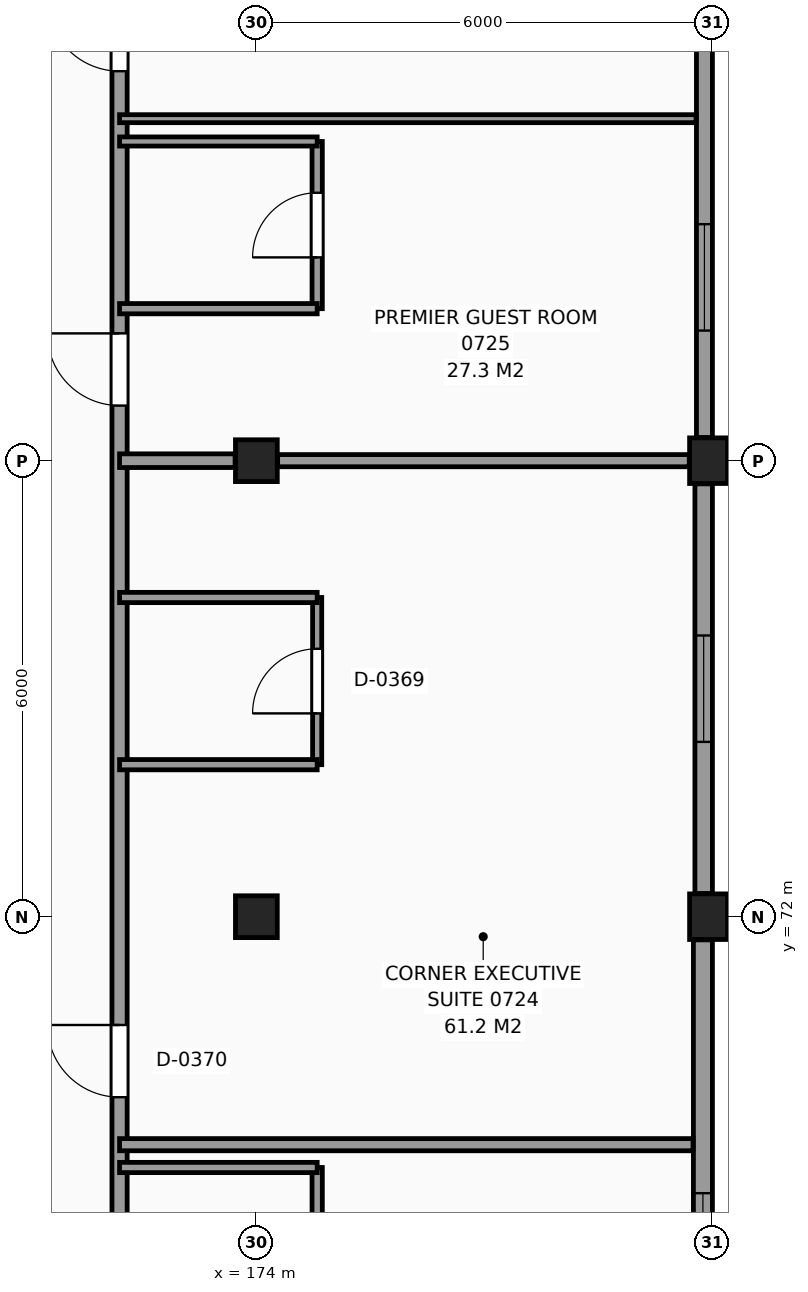
"""IFC4 building model, lengths in metres.
Left out: names, types, materials, properties, quantities, classifications, styles, units other than length and angle.
Written with IfcOpenShell. Run it as: python <this file> out.ifc"""

import sys

from ifc_helpers import new_model, si_unit, direction, frame, frame_2d, origin, origin_2d, place, context, subcontext, project, spatial, rectangle, extrude, element, fill, save


model = new_model("IFC4")
c1 = context("Model", 3, precision=1e-05, world=origin(), true_north=direction((0.0, 1.0)))
c2 = subcontext(c1, "Body", "Model", "MODEL_VIEW")
j1 = project(units=[si_unit("LENGTHUNIT", "METRE"), si_unit("PLANEANGLEUNIT", "RADIAN")], contexts=[c1])
p1 = place(None, origin())
s1 = spatial("IfcSite", under=j1, at=p1, CompositionType="ELEMENT")
p2 = place(p1, origin())
s2 = spatial("IfcBuilding", under=s1, at=p2, CompositionType="ELEMENT")
p3 = place(p2, frame((0.0, 0.0, 31.5)))
s3 = spatial("IfcBuildingStorey", under=s2, at=p3, CompositionType="ELEMENT", Elevation=31.5)
for number, where, z_axis, x_axis in (
    (1, (174.0, 72.0, 0.0), (0.0, 0.0, 1.0), (1.0, 0.0, 0.0)),
    (2, (174.0, 78.0, 0.0), (0.0, 0.0, 1.0), (1.0, 0.0, 0.0)),
):
    element("IfcColumn", number, at=place(p3, frame(where, z_axis=z_axis, x_axis=x_axis)), inside=s3, PredefinedType="COLUMN", context=c2, shape_type="SweptSolid", body=[
        extrude(rectangle(XDim=0.55, YDim=0.55, at=origin_2d()), origin(), (0.0, 0.0, 1.0), 3.3),
    ])
for number, where, z_axis, x_axis in (
    (3, (180.0, 72.0, 0.0), (0.0, 0.0, 1.0), (1.0, 0.0, 0.0)),
    (4, (180.0, 78.0, 0.0), (0.0, 0.0, 1.0), (1.0, 0.0, 0.0)),
):
    element("IfcColumn", number, at=place(p3, frame(where, z_axis=z_axis, x_axis=x_axis)), inside=s3, PredefinedType="COLUMN", context=c2, shape_type="SweptSolid", body=[
        extrude(rectangle(XDim=0.6, YDim=0.6, at=origin_2d()), origin(), (0.0, 0.0, 1.0), 3.3),
    ])
p4 = place(p3, frame((179.875, 66.305, 0.0), z_axis=(0.0, 0.0, 1.0), x_axis=(0.0, 1.0, 0.0)))
e5 = element("IfcWall", 5, at=p4, inside=s3, PredefinedType="SOLIDWALL", context=c2, shape_type="SweptSolid", body=[
    extrude(rectangle(XDim=5.39, YDim=0.25, at=frame_2d((2.695, 0.0))), origin(), (0.0, 0.0, 1.0), 2.42),
])
p5 = place(p4, frame((0.657, 0.0, 0.8)))
e6 = element("IfcOpeningElement", 6, at=p5, cuts=e5, PredefinedType="OPENING", context=c2, shape_type="SweptSolid", body=[
    extrude(rectangle(XDim=1.4, YDim=1.4, at=frame_2d((0.7, 0.7))), frame((0.0, 0.135, 0.0), z_axis=(0.0, -1.0, 0.0), x_axis=(1.0, 0.0, 0.0)), (0.0, 0.0, 1.0), 0.27),
])
p6 = place(p3, frame((179.885, 72.305, 0.0), z_axis=(0.0, 0.0, 1.0), x_axis=(0.0, 1.0, 0.0)))
e7 = element("IfcWall", 7, at=p6, inside=s3, PredefinedType="SOLIDWALL", context=c2, shape_type="SweptSolid", body=[
    extrude(rectangle(XDim=5.39, YDim=0.23, at=frame_2d((2.695, 0.0))), origin(), (0.0, 0.0, 1.0), 2.42),
])
p7 = place(p6, frame((1.995, 0.0, 0.8)))
e8 = element("IfcOpeningElement", 8, at=p7, cuts=e7, PredefinedType="OPENING", context=c2, shape_type="SweptSolid", body=[
    extrude(rectangle(XDim=1.4, YDim=1.4, at=frame_2d((0.7, 0.7))), frame((0.0, 0.125, 0.0), z_axis=(0.0, -1.0, 0.0), x_axis=(1.0, 0.0, 0.0)), (0.0, 0.0, 1.0), 0.25),
])
p8 = place(p3, frame((179.895, 78.305, 0.0), z_axis=(0.0, 0.0, 1.0), x_axis=(0.0, 1.0, 0.0)))
e9 = element("IfcWall", 9, at=p8, inside=s3, PredefinedType="SOLIDWALL", context=c2, shape_type="SweptSolid", body=[
    extrude(rectangle(XDim=5.39, YDim=0.21, at=frame_2d((2.695, 0.0))), origin(), (0.0, 0.0, 1.0), 2.42),
])
p9 = place(p8, frame((1.407, 0.0, 0.8)))
e10 = element("IfcOpeningElement", 10, at=p9, cuts=e9, PredefinedType="OPENING", context=c2, shape_type="SweptSolid", body=[
    extrude(rectangle(XDim=1.4, YDim=1.4, at=frame_2d((0.7, 0.7))), frame((0.0, 0.115, 0.0), z_axis=(0.0, -1.0, 0.0), x_axis=(1.0, 0.0, 0.0)), (0.0, 0.0, 1.0), 0.23),
])
p10 = place(p3, frame((172.2, 42.255, 0.0), z_axis=(0.0, 0.0, 1.0), x_axis=(0.0, 1.0, 0.0)))
e11 = element("IfcWall", 11, at=p10, inside=s3, PredefinedType="PARTITIONING", context=c2, shape_type="SweptSolid", body=[
    extrude(rectangle(XDim=65.565, YDim=0.2, at=frame_2d((32.783, 0.0))), origin(), (0.0, 0.0, 1.0), 3.07),
])
p11 = place(p10, frame((0.42, 0.0, 0.0)))
e12 = element("IfcOpeningElement", 12, at=p11, cuts=e11, PredefinedType="OPENING", context=c2, shape_type="SweptSolid", body=[
    extrude(rectangle(XDim=0.95, YDim=2.1, at=frame_2d((0.475, 1.05))), frame((0.0, 0.11, 0.0), z_axis=(0.0, -1.0, 0.0), x_axis=(1.0, 0.0, 0.0)), (0.0, 0.0, 1.0), 0.22),
])
p12 = place(p10, frame((6.47, 0.0, 0.0)))
e13 = element("IfcOpeningElement", 13, at=p12, cuts=e11, PredefinedType="OPENING", context=c2, shape_type="SweptSolid", body=[
    extrude(rectangle(XDim=0.95, YDim=2.1, at=frame_2d((0.475, 1.05))), frame((0.0, 0.11, 0.0), z_axis=(0.0, -1.0, 0.0), x_axis=(1.0, 0.0, 0.0)), (0.0, 0.0, 1.0), 0.22),
])
p13 = place(p10, frame((16.27, 0.0, 0.0)))
e14 = element("IfcOpeningElement", 14, at=p13, cuts=e11, PredefinedType="OPENING", context=c2, shape_type="SweptSolid", body=[
    extrude(rectangle(XDim=0.95, YDim=2.1, at=frame_2d((0.475, 1.05))), frame((0.0, 0.11, 0.0), z_axis=(0.0, -1.0, 0.0), x_axis=(1.0, 0.0, 0.0)), (0.0, 0.0, 1.0), 0.22),
])
p14 = place(p10, frame((18.47, 0.0, 0.0)))
e15 = element("IfcOpeningElement", 15, at=p14, cuts=e11, PredefinedType="OPENING", context=c2, shape_type="SweptSolid", body=[
    extrude(rectangle(XDim=0.95, YDim=2.1, at=frame_2d((0.475, 1.05))), frame((0.0, 0.11, 0.0), z_axis=(0.0, -1.0, 0.0), x_axis=(1.0, 0.0, 0.0)), (0.0, 0.0, 1.0), 0.22),
])
p15 = place(p10, frame((22.87, 0.0, 0.0)))
e16 = element("IfcOpeningElement", 16, at=p15, cuts=e11, PredefinedType="OPENING", context=c2, shape_type="SweptSolid", body=[
    extrude(rectangle(XDim=0.95, YDim=2.1, at=frame_2d((0.475, 1.05))), frame((0.0, 0.11, 0.0), z_axis=(0.0, -1.0, 0.0), x_axis=(1.0, 0.0, 0.0)), (0.0, 0.0, 1.0), 0.22),
])
p16 = place(p10, frame((27.37, 0.0, 0.0)))
e17 = element("IfcOpeningElement", 17, at=p16, cuts=e11, PredefinedType="OPENING", context=c2, shape_type="SweptSolid", body=[
    extrude(rectangle(XDim=0.95, YDim=2.1, at=frame_2d((0.475, 1.05))), frame((0.0, 0.11, 0.0), z_axis=(0.0, -1.0, 0.0), x_axis=(1.0, 0.0, 0.0)), (0.0, 0.0, 1.0), 0.22),
])
p17 = place(p10, frame((36.47, 0.0, 0.0)))
e18 = element("IfcOpeningElement", 18, at=p17, cuts=e11, PredefinedType="OPENING", context=c2, shape_type="SweptSolid", body=[
    extrude(rectangle(XDim=0.95, YDim=2.1, at=frame_2d((0.475, 1.05))), frame((0.0, 0.11, 0.0), z_axis=(0.0, -1.0, 0.0), x_axis=(1.0, 0.0, 0.0)), (0.0, 0.0, 1.0), 0.22),
])
p18 = place(p10, frame((40.87, 0.0, 0.0)))
e19 = element("IfcOpeningElement", 19, at=p18, cuts=e11, PredefinedType="OPENING", context=c2, shape_type="SweptSolid", body=[
    extrude(rectangle(XDim=0.95, YDim=2.1, at=frame_2d((0.475, 1.05))), frame((0.0, 0.11, 0.0), z_axis=(0.0, -1.0, 0.0), x_axis=(1.0, 0.0, 0.0)), (0.0, 0.0, 1.0), 0.22),
])
p19 = place(p10, frame((48.07, 0.0, 0.0)))
e20 = element("IfcOpeningElement", 20, at=p19, cuts=e11, PredefinedType="OPENING", context=c2, shape_type="SweptSolid", body=[
    extrude(rectangle(XDim=0.95, YDim=2.1, at=frame_2d((0.475, 1.05))), frame((0.0, 0.11, 0.0), z_axis=(0.0, -1.0, 0.0), x_axis=(1.0, 0.0, 0.0)), (0.0, 0.0, 1.0), 0.22),
])
p20 = place(p10, frame((56.32, 0.0, 0.0)))
e21 = element("IfcOpeningElement", 21, at=p20, cuts=e11, PredefinedType="OPENING", context=c2, shape_type="SweptSolid", body=[
    extrude(rectangle(XDim=0.95, YDim=2.1, at=frame_2d((0.475, 1.05))), frame((0.0, 0.11, 0.0), z_axis=(0.0, -1.0, 0.0), x_axis=(1.0, 0.0, 0.0)), (0.0, 0.0, 1.0), 0.22),
])
p21 = place(p10, frame((60.47, 0.0, 0.0)))
e22 = element("IfcOpeningElement", 22, at=p21, cuts=e11, PredefinedType="OPENING", context=c2, shape_type="SweptSolid", body=[
    extrude(rectangle(XDim=0.95, YDim=2.1, at=frame_2d((0.475, 1.05))), frame((0.0, 0.11, 0.0), z_axis=(0.0, -1.0, 0.0), x_axis=(1.0, 0.0, 0.0)), (0.0, 0.0, 1.0), 0.22),
])
p22 = place(p3, frame((174.8, 66.5, 0.0), z_axis=(0.0, 0.0, 1.0), x_axis=(0.0, 1.0, 0.0)))
e23 = element("IfcWall", 23, at=p22, inside=s3, PredefinedType="PARTITIONING", context=c2, shape_type="SweptSolid", body=[
    extrude(rectangle(XDim=2.2, YDim=0.135, at=frame_2d((1.1, 0.0))), origin(), (0.0, 0.0, 1.0), 3.07),
])
p23 = place(p22, frame((0.675, 0.0, 0.0)))
e24 = element("IfcOpeningElement", 24, at=p23, cuts=e23, PredefinedType="OPENING", context=c2, shape_type="SweptSolid", body=[
    extrude(rectangle(XDim=0.85, YDim=2.1, at=frame_2d((0.425, 1.05))), frame((0.0, 0.078, 0.0), z_axis=(0.0, -1.0, 0.0), x_axis=(1.0, 0.0, 0.0)), (0.0, 0.0, 1.0), 0.155),
])
p24 = place(p3, frame((174.8, 74.0, 0.0), z_axis=(0.0, 0.0, 1.0), x_axis=(0.0, 1.0, 0.0)))
e25 = element("IfcWall", 25, at=p24, inside=s3, PredefinedType="PARTITIONING", context=c2, shape_type="SweptSolid", body=[
    extrude(rectangle(XDim=2.2, YDim=0.12, at=frame_2d((1.1, 0.0))), origin(), (0.0, 0.0, 1.0), 3.07),
])
p25 = place(p24, frame((0.675, 0.0, 0.0)))
e26 = element("IfcOpeningElement", 26, at=p25, cuts=e25, PredefinedType="OPENING", context=c2, shape_type="SweptSolid", body=[
    extrude(rectangle(XDim=0.85, YDim=2.1, at=frame_2d((0.425, 1.05))), frame((0.0, 0.07, 0.0), z_axis=(0.0, -1.0, 0.0), x_axis=(1.0, 0.0, 0.0)), (0.0, 0.0, 1.0), 0.14),
])
p26 = place(p3, frame((174.8, 80.0, 0.0), z_axis=(0.0, 0.0, 1.0), x_axis=(0.0, 1.0, 0.0)))
e27 = element("IfcWall", 27, at=p26, inside=s3, PredefinedType="PARTITIONING", context=c2, shape_type="SweptSolid", body=[
    extrude(rectangle(XDim=2.2, YDim=0.135, at=frame_2d((1.1, 0.0))), origin(), (0.0, 0.0, 1.0), 3.07),
])
p27 = place(p26, frame((0.675, 0.0, 0.0)))
e28 = element("IfcOpeningElement", 28, at=p27, cuts=e27, PredefinedType="OPENING", context=c2, shape_type="SweptSolid", body=[
    extrude(rectangle(XDim=0.85, YDim=2.1, at=frame_2d((0.425, 1.05))), frame((0.0, 0.078, 0.0), z_axis=(0.0, -1.0, 0.0), x_axis=(1.0, 0.0, 0.0)), (0.0, 0.0, 1.0), 0.155),
])
p28 = place(p3, frame((172.2, 68.7, 0.0), z_axis=(0.0, 0.0, 1.0), x_axis=(1.0, 0.0, 0.0)))
e29 = element("IfcWall", 29, at=p28, inside=s3, PredefinedType="PARTITIONING", context=c2, shape_type="SweptSolid", body=[
    extrude(rectangle(XDim=2.6, YDim=0.135, at=frame_2d((1.3, 0.0))), origin(), (0.0, 0.0, 1.0), 3.07),
])
p29 = place(p3, frame((172.2, 69.0, 0.0), z_axis=(0.0, 0.0, 1.0), x_axis=(1.0, 0.0, 0.0)))
e30 = element("IfcWall", 30, at=p29, inside=s3, PredefinedType="PARTITIONING", context=c2, shape_type="SweptSolid", body=[
    extrude(rectangle(XDim=7.545, YDim=0.16, at=frame_2d((3.772, 0.0))), origin(), (0.0, 0.0, 1.0), 3.07),
])
for number, where, z_axis, x_axis in (
    (31, (172.2, 74.0, 0.0), (0.0, 0.0, 1.0), (1.0, 0.0, 0.0)),
    (32, (172.2, 76.2, 0.0), (0.0, 0.0, 1.0), (1.0, 0.0, 0.0)),
):
    element("IfcWall", number, at=place(p3, frame(where, z_axis=z_axis, x_axis=x_axis)), inside=s3, PredefinedType="PARTITIONING", context=c2, shape_type="SweptSolid", body=[
        extrude(rectangle(XDim=2.6, YDim=0.135, at=frame_2d((1.3, 0.0))), origin(), (0.0, 0.0, 1.0), 3.07),
    ])
p30 = place(p3, frame((172.2, 78.0, 0.0), z_axis=(0.0, 0.0, 1.0), x_axis=(1.0, 0.0, 0.0)))
e33 = element("IfcWall", 33, at=p30, inside=s3, PredefinedType="PARTITIONING", context=c2, shape_type="SweptSolid", body=[
    extrude(rectangle(XDim=1.52, YDim=0.18, at=frame_2d((0.76, 0.0))), origin(), (0.0, 0.0, 1.0), 2.27),
])
p31 = place(p3, frame((174.28, 78.0, 0.0), z_axis=(0.0, 0.0, 1.0), x_axis=(1.0, 0.0, 0.0)))
e34 = element("IfcWall", 34, at=p31, inside=s3, PredefinedType="PARTITIONING", context=c2, shape_type="SweptSolid", body=[
    extrude(rectangle(XDim=5.415, YDim=0.16, at=frame_2d((2.708, 0.0))), origin(), (0.0, 0.0, 1.0), 2.27),
])
p32 = place(p3, frame((172.2, 80.0, 0.0), z_axis=(0.0, 0.0, 1.0), x_axis=(1.0, 0.0, 0.0)))
e35 = element("IfcWall", 35, at=p32, inside=s3, PredefinedType="PARTITIONING", context=c2, shape_type="SweptSolid", body=[
    extrude(rectangle(XDim=2.6, YDim=0.135, at=frame_2d((1.3, 0.0))), origin(), (0.0, 0.0, 1.0), 3.07),
])
p33 = place(p3, frame((172.2, 82.2, 0.0), z_axis=(0.0, 0.0, 1.0), x_axis=(1.0, 0.0, 0.0)))
e36 = element("IfcWall", 36, at=p33, inside=s3, PredefinedType="PARTITIONING", context=c2, shape_type="SweptSolid", body=[
    extrude(rectangle(XDim=2.6, YDim=0.12, at=frame_2d((1.3, 0.0))), origin(), (0.0, 0.0, 1.0), 3.07),
])
p34 = place(p3, frame((172.2, 82.5, 0.0), z_axis=(0.0, 0.0, 1.0), x_axis=(1.0, 0.0, 0.0)))
e37 = element("IfcWall", 37, at=p34, inside=s3, PredefinedType="PARTITIONING", context=c2, shape_type="SweptSolid", body=[
    extrude(rectangle(XDim=7.585, YDim=0.105, at=frame_2d((3.792, 0.0))), origin(), (0.0, 0.0, 1.0), 3.07),
])
p35 = place(p5, origin())
e38 = element("IfcWindow", 38, at=p35, inside=s3, PartitioningType="SINGLE_PANEL", PredefinedType="WINDOW", context=c2, shape_type="SweptSolid", body=[
    extrude(rectangle(XDim=1.4, YDim=1.4, at=frame_2d((0.7, 0.7))), frame((0.0, 0.03, 0.0), z_axis=(0.0, -1.0, 0.0), x_axis=(1.0, 0.0, 0.0)), (0.0, 0.0, 1.0), 0.06),
])
fill(e6, e38)
p36 = place(p7, origin())
e39 = element("IfcWindow", 39, at=p36, inside=s3, PartitioningType="SINGLE_PANEL", PredefinedType="WINDOW", context=c2, shape_type="SweptSolid", body=[
    extrude(rectangle(XDim=1.4, YDim=1.4, at=frame_2d((0.7, 0.7))), frame((0.0, 0.03, 0.0), z_axis=(0.0, -1.0, 0.0), x_axis=(1.0, 0.0, 0.0)), (0.0, 0.0, 1.0), 0.06),
])
fill(e8, e39)
p37 = place(p9, origin())
e40 = element("IfcWindow", 40, at=p37, inside=s3, PartitioningType="SINGLE_PANEL", PredefinedType="WINDOW", context=c2, shape_type="SweptSolid", body=[
    extrude(rectangle(XDim=1.4, YDim=1.4, at=frame_2d((0.7, 0.7))), frame((0.0, 0.03, 0.0), z_axis=(0.0, -1.0, 0.0), x_axis=(1.0, 0.0, 0.0)), (0.0, 0.0, 1.0), 0.06),
])
fill(e10, e40)
p38 = place(p25, origin())
e41 = element("IfcDoor", 41, at=p38, inside=s3, OperationType="SINGLE_SWING_LEFT", PredefinedType="DOOR", context=c2, shape_type="SweptSolid", body=[
    extrude(rectangle(XDim=0.85, YDim=2.1, at=frame_2d((0.425, 1.05))), frame((0.0, 0.025, 0.0), z_axis=(0.0, -1.0, 0.0), x_axis=(1.0, 0.0, 0.0)), (0.0, 0.0, 1.0), 0.05),
])
fill(e26, e41)
p39 = place(p16, origin())
e42 = element("IfcDoor", 42, at=p39, inside=s3, OperationType="SINGLE_SWING_RIGHT", PredefinedType="DOOR", context=c2, shape_type="SweptSolid", body=[
    extrude(rectangle(XDim=0.95, YDim=2.1, at=frame_2d((0.475, 1.05))), frame((0.0, 0.025, 0.0), z_axis=(0.0, -1.0, 0.0), x_axis=(1.0, 0.0, 0.0)), (0.0, 0.0, 1.0), 0.05),
])
fill(e17, e42)
p40 = place(p27, origin())
e43 = element("IfcDoor", 43, at=p40, inside=s3, OperationType="SINGLE_SWING_LEFT", PredefinedType="DOOR", context=c2, shape_type="SweptSolid", body=[
    extrude(rectangle(XDim=0.85, YDim=2.1, at=frame_2d((0.425, 1.05))), frame((0.0, 0.025, 0.0), z_axis=(0.0, -1.0, 0.0), x_axis=(1.0, 0.0, 0.0)), (0.0, 0.0, 1.0), 0.05),
])
fill(e28, e43)
p41 = place(p17, origin())
e44 = element("IfcDoor", 44, at=p41, inside=s3, OperationType="SINGLE_SWING_RIGHT", PredefinedType="DOOR", context=c2, shape_type="SweptSolid", body=[
    extrude(rectangle(XDim=0.95, YDim=2.1, at=frame_2d((0.475, 1.05))), frame((0.0, 0.025, 0.0), z_axis=(0.0, -1.0, 0.0), x_axis=(1.0, 0.0, 0.0)), (0.0, 0.0, 1.0), 0.05),
])
fill(e18, e44)
p42 = place(p18, origin())
e45 = element("IfcDoor", 45, at=p42, inside=s3, OperationType="SINGLE_SWING_RIGHT", PredefinedType="DOOR", context=c2, shape_type="SweptSolid", body=[
    extrude(rectangle(XDim=0.95, YDim=2.1, at=frame_2d((0.475, 1.05))), frame((0.0, 0.025, 0.0), z_axis=(0.0, -1.0, 0.0), x_axis=(1.0, 0.0, 0.0)), (0.0, 0.0, 1.0), 0.05),
])
fill(e19, e45)
save(model, sys.argv[1])
